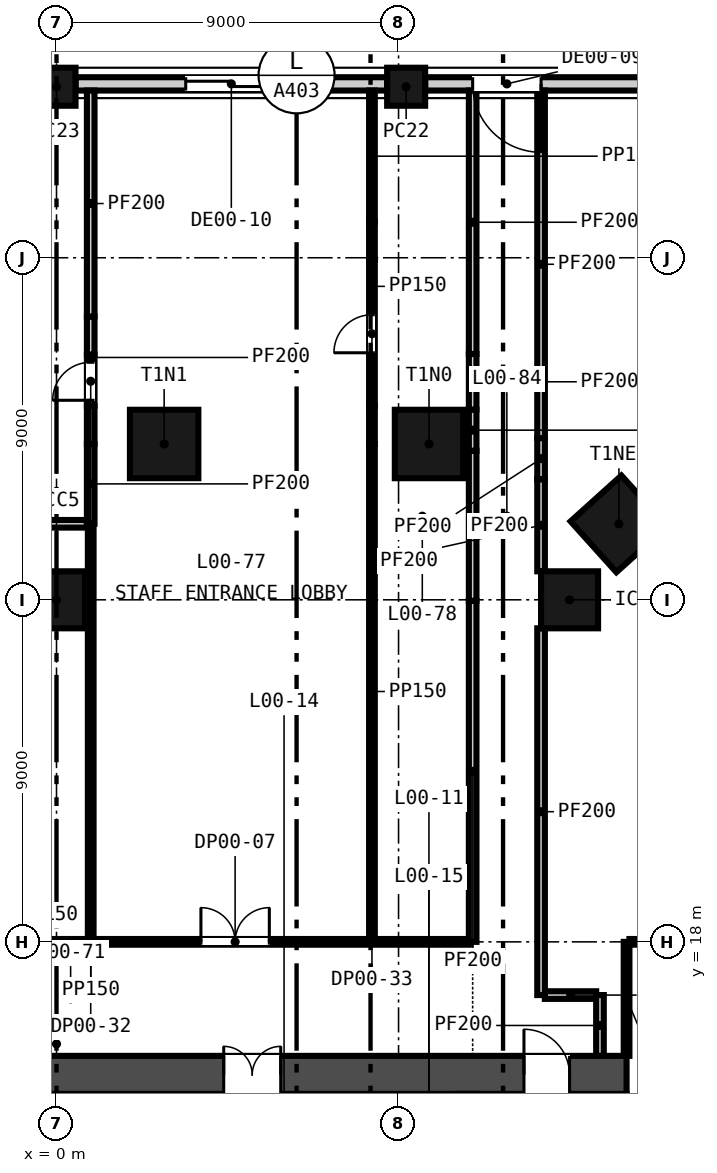
"""IFC4 building model, lengths in metres.
Left out: names, types, materials, properties, quantities, classifications, styles, units other than length and angle.
Written with IfcOpenShell. Run it as: python <this file> out.ifc"""

import sys

from ifc_helpers import new_model, si_unit, direction, frame, frame_2d, origin, origin_2d, place, context, subcontext, project, spatial, rectangle, extrude, element, fill, save


model = new_model("IFC4")
c1 = context("Model", 3, precision=1e-05, world=origin(), true_north=direction((0.0, 1.0)))
c2 = subcontext(c1, "Body", "Model", "MODEL_VIEW")
j1 = project(units=[si_unit("LENGTHUNIT", "METRE"), si_unit("PLANEANGLEUNIT", "RADIAN")], contexts=[c1])
p1 = place(None, origin())
s1 = spatial("IfcSite", under=j1, at=p1, CompositionType="ELEMENT")
p2 = place(p1, origin())
s2 = spatial("IfcBuilding", under=s1, at=p2, CompositionType="ELEMENT")
p3 = place(p2, origin())
s3 = spatial("IfcBuildingStorey", under=s2, at=p3, CompositionType="ELEMENT", Elevation=0.0)
p4 = place(p3, frame((-15.0, 14.5, -2.2), z_axis=(0.0, 0.0, 1.0), x_axis=(1.0, 0.0, 0.0)))
e1 = element("IfcWall", 1, at=p4, inside=s3, PredefinedType="SOLIDWALL", context=c2, shape_type="SweptSolid", body=[
    extrude(rectangle(XDim=30.0, YDim=1.0, at=frame_2d((15.0, 0.0))), origin(), (0.0, 0.0, 1.0), 10.8),
])
p5 = place(p4, frame((9.25, 0.0, 2.2)))
e2 = element("IfcOpeningElement", 2, at=p5, cuts=e1, PredefinedType="OPENING", context=c2, shape_type="SweptSolid", body=[
    extrude(rectangle(XDim=1.5, YDim=2.1, at=frame_2d((0.75, 1.05))), frame((0.0, 0.51, 0.0), z_axis=(0.0, -1.0, 0.0), x_axis=(1.0, 0.0, 0.0)), (0.0, 0.0, 1.0), 1.02),
])
p6 = place(p4, frame((19.4, 0.0, 2.2)))
e3 = element("IfcOpeningElement", 3, at=p6, cuts=e1, PredefinedType="OPENING", context=c2, shape_type="SweptSolid", body=[
    extrude(rectangle(XDim=1.5, YDim=2.1, at=frame_2d((0.75, 1.05))), frame((0.0, 0.51, 0.0), z_axis=(0.0, -1.0, 0.0), x_axis=(1.0, 0.0, 0.0)), (0.0, 0.0, 1.0), 1.02),
])
p7 = place(p4, frame((1.5, 0.0, 2.2)))
e4 = element("IfcOpeningElement", 4, at=p7, cuts=e1, PredefinedType="OPENING", context=c2, shape_type="SweptSolid", body=[
    extrude(rectangle(XDim=1.2, YDim=2.1, at=frame_2d((0.6, 1.05))), frame((0.0, 0.51, 0.0), z_axis=(0.0, -1.0, 0.0), x_axis=(1.0, 0.0, 0.0)), (0.0, 0.0, 1.0), 1.02),
])
p8 = place(p4, frame((27.3, 0.0, 2.2)))
e5 = element("IfcOpeningElement", 5, at=p8, cuts=e1, PredefinedType="OPENING", context=c2, shape_type="SweptSolid", body=[
    extrude(rectangle(XDim=1.2, YDim=2.1, at=frame_2d((0.6, 1.05))), frame((0.0, 0.51, 0.0), z_axis=(0.0, -1.0, 0.0), x_axis=(1.0, 0.0, 0.0)), (0.0, 0.0, 1.0), 1.02),
])
for number, where, z_axis, x_axis in (
    (6, (9.802, 31.1, -0.3), (0.0, 0.0, 1.0), (-1.0, 0.0, 0.0)),
    (7, (2.832, 31.1, -0.3), (0.0, 0.0, 1.0), (-1.0, 0.0, 0.0)),
    (8, (14.799, 28.998, -0.3), (0.0, 0.0, 1.0), (-0.669, 0.743, 0.0)),
):
    element("IfcColumn", number, at=place(p3, frame(where, z_axis=z_axis, x_axis=x_axis)), inside=s3, PredefinedType="COLUMN", context=c2, shape_type="SweptSolid", body=[
        extrude(rectangle(XDim=1.8, YDim=1.8, at=origin_2d()), origin(), (0.0, 0.0, 1.0), 8.9),
    ])
for number, where, z_axis, x_axis in (
    (9, (0.0, 27.0, -0.3), (0.0, 0.0, 1.0), (1.0, 0.0, 0.0)),
    (10, (13.5, 27.0, -0.3), (0.0, 0.0, 1.0), (1.0, 0.0, 0.0)),
):
    element("IfcColumn", number, at=place(p3, frame(where, z_axis=z_axis, x_axis=x_axis)), inside=s3, PredefinedType="COLUMN", context=c2, shape_type="SweptSolid", body=[
        extrude(rectangle(XDim=1.5, YDim=1.5, at=origin_2d()), origin(), (0.0, 0.0, 1.0), 8.9),
    ])
for number, where, z_axis, x_axis in (
    (11, (9.2, 40.5, -0.3), (0.0, 0.0, 1.0), (-1.0, 0.0, 0.0)),
    (12, (0.0, 40.5, -0.3), (0.0, 0.0, 1.0), (-1.0, 0.0, 0.0)),
):
    element("IfcColumn", number, at=place(p3, frame(where, z_axis=z_axis, x_axis=x_axis)), inside=s3, PredefinedType="COLUMN", context=c2, shape_type="SweptSolid", body=[
        extrude(rectangle(XDim=1.0, YDim=1.0, at=origin_2d()), origin(), (0.0, 0.0, 1.0), 8.9),
    ])
p9 = place(p3, frame((17.9, 40.575, -0.3), z_axis=(0.0, 0.0, 1.0), x_axis=(-1.0, 0.0, 0.0)))
e13 = element("IfcWall", 13, at=p9, inside=s3, PredefinedType="SOLIDWALL", context=c2, shape_type="SweptSolid", body=[
    extrude(rectangle(XDim=8.2, YDim=0.35, at=frame_2d((4.1, 0.0))), origin(), (0.0, 0.0, 1.0), 8.0),
])
p10 = place(p9, frame((5.15, 0.0, 0.3)))
e14 = element("IfcOpeningElement", 14, at=p10, cuts=e13, PredefinedType="OPENING", context=c2, shape_type="SweptSolid", body=[
    extrude(rectangle(XDim=1.8, YDim=2.4, at=frame_2d((0.9, 1.2))), frame((0.0, 0.185, 0.0), z_axis=(0.0, -1.0, 0.0), x_axis=(1.0, 0.0, 0.0)), (0.0, 0.0, 1.0), 0.37),
])
p11 = place(p3, frame((8.7, 40.575, -0.3), z_axis=(0.0, 0.0, 1.0), x_axis=(-1.0, 0.0, 0.0)))
e15 = element("IfcWall", 15, at=p11, inside=s3, PredefinedType="SOLIDWALL", context=c2, shape_type="SweptSolid", body=[
    extrude(rectangle(XDim=8.2, YDim=0.35, at=frame_2d((4.1, 0.0))), origin(), (0.0, 0.0, 1.0), 8.0),
])
p12 = place(p11, frame((2.9, 0.0, 0.3)))
e16 = element("IfcOpeningElement", 16, at=p12, cuts=e15, PredefinedType="OPENING", context=c2, shape_type="SweptSolid", body=[
    extrude(rectangle(XDim=2.4, YDim=2.4, at=frame_2d((1.2, 1.2))), frame((0.0, 0.185, 0.0), z_axis=(0.0, -1.0, 0.0), x_axis=(1.0, 0.0, 0.0)), (0.0, 0.0, 1.0), 0.37),
])
for number, where, z_axis, x_axis in (
    (17, (1.475, 11.3, 0.0), (0.0, 0.0, 1.0), (0.0, 1.0, 0.0)),
    (18, (4.275, 11.3, 0.0), (0.0, 0.0, 1.0), (0.0, 1.0, 0.0)),
    (19, (6.025, 11.3, 0.0), (0.0, 0.0, 1.0), (0.0, 1.0, 0.0)),
    (20, (8.825, 11.3, 0.0), (0.0, 0.0, 1.0), (0.0, 1.0, 0.0)),
):
    element("IfcWall", number, at=place(p3, frame(where, z_axis=z_axis, x_axis=x_axis)), inside=s3, PredefinedType="PARTITIONING", context=c2, shape_type="SweptSolid", body=[
        extrude(rectangle(XDim=2.7, YDim=0.25, at=frame_2d((1.35, 0.0))), origin(), (0.0, 0.0, 1.0), 8.6),
    ])
p13 = place(p3, frame((12.85, 16.6, 0.0), z_axis=(0.0, 0.0, 1.0), x_axis=(1.0, 0.0, 0.0)))
e21 = element("IfcWall", 21, at=p13, inside=s3, PredefinedType="PARTITIONING", context=c2, shape_type="SweptSolid", body=[
    extrude(rectangle(XDim=1.35, YDim=0.2, at=frame_2d((0.675, 0.0))), origin(), (0.0, 0.0, 1.0), 8.6),
])
p14 = place(p3, frame((-10.107, 18.0, 0.0), z_axis=(0.0, 0.0, 1.0), x_axis=(1.0, 0.0, 0.0)))
e22 = element("IfcWall", 22, at=p14, inside=s3, PredefinedType="PARTITIONING", context=c2, shape_type="SweptSolid", body=[
    extrude(rectangle(XDim=20.957, YDim=0.15, at=frame_2d((10.479, 0.0))), origin(), (0.0, 0.0, 1.0), 8.6),
])
p15 = place(p14, frame((13.907, 0.0, 0.0)))
e23 = element("IfcOpeningElement", 23, at=p15, cuts=e22, PredefinedType="OPENING", context=c2, shape_type="SweptSolid", body=[
    extrude(rectangle(XDim=1.8, YDim=2.4, at=frame_2d((0.9, 1.2))), frame((0.0, 0.085, 0.0), z_axis=(0.0, -1.0, 0.0), x_axis=(1.0, 0.0, 0.0)), (0.0, 0.0, 1.0), 0.17),
])
p16 = place(p14, frame((4.9, 0.0, 0.0)))
e24 = element("IfcOpeningElement", 24, at=p16, cuts=e22, PredefinedType="OPENING", context=c2, shape_type="SweptSolid", body=[
    extrude(rectangle(XDim=1.0, YDim=2.1, at=frame_2d((0.5, 1.05))), frame((0.0, 0.085, 0.0), z_axis=(0.0, -1.0, 0.0), x_axis=(1.0, 0.0, 0.0)), (0.0, 0.0, 1.0), 0.17),
])
p17 = place(p3, frame((15.075, 18.0, 0.0), z_axis=(0.0, 0.0, 1.0), x_axis=(1.0, 0.0, 0.0)))
e25 = element("IfcWall", 25, at=p17, inside=s3, PredefinedType="PARTITIONING", context=c2, shape_type="SweptSolid", body=[
    extrude(rectangle(XDim=2.85, YDim=0.15, at=frame_2d((1.425, 0.0))), origin(), (0.0, 0.0, 1.0), 8.6),
])
p18 = place(p3, frame((-10.107, 29.0, 0.0), z_axis=(0.0, 0.0, 1.0), x_axis=(1.0, 0.0, 0.0)))
e26 = element("IfcWall", 26, at=p18, inside=s3, PredefinedType="PARTITIONING", context=c2, shape_type="SweptSolid", body=[
    extrude(rectangle(XDim=10.907, YDim=0.2, at=frame_2d((5.454, 0.0))), origin(), (0.0, 0.0, 1.0), 8.6),
])
p19 = place(p3, frame((0.9, 18.075, 0.0), z_axis=(0.0, 0.0, 1.0), x_axis=(0.0, 1.0, 0.0)))
e27 = element("IfcWall", 27, at=p19, inside=s3, PredefinedType="PARTITIONING", context=c2, shape_type="SweptSolid", body=[
    extrude(rectangle(XDim=10.925, YDim=0.15, at=frame_2d((5.462, 0.0))), origin(), (0.0, 0.0, 1.0), 8.6),
])
p20 = place(p3, frame((0.9, 29.0, 0.0), z_axis=(0.0, 0.0, 1.0), x_axis=(0.0, 1.0, 0.0)))
e28 = element("IfcWall", 28, at=p20, inside=s3, PredefinedType="PARTITIONING", context=c2, shape_type="SweptSolid", body=[
    extrude(rectangle(XDim=2.1, YDim=0.2, at=frame_2d((1.05, 0.0))), origin(), (0.0, 0.0, 1.0), 8.6),
])
p21 = place(p3, frame((0.9, 31.1, 0.0), z_axis=(0.0, 0.0, 1.0), x_axis=(0.0, 1.0, 0.0)))
e29 = element("IfcWall", 29, at=p21, inside=s3, PredefinedType="PARTITIONING", context=c2, shape_type="SweptSolid", body=[
    extrude(rectangle(XDim=1.0, YDim=0.2, at=frame_2d((0.5, 0.0))), origin(), (0.0, 0.0, 1.0), 7.6),
])
p22 = place(p3, frame((0.9, 32.1, 0.0), z_axis=(0.0, 0.0, 1.0), x_axis=(0.0, 1.0, 0.0)))
e30 = element("IfcWall", 30, at=p22, inside=s3, PredefinedType="PARTITIONING", context=c2, shape_type="SweptSolid", body=[
    extrude(rectangle(XDim=1.353, YDim=0.2, at=frame_2d((0.677, 0.0))), origin(), (0.0, 0.0, 1.0), 8.6),
])
p23 = place(p22, frame((0.15, 0.0, 0.0)))
e31 = element("IfcOpeningElement", 31, at=p23, cuts=e30, PredefinedType="OPENING", context=c2, shape_type="SweptSolid", body=[
    extrude(rectangle(XDim=1.0, YDim=2.1, at=frame_2d((0.5, 1.05))), frame((0.0, 0.11, 0.0), z_axis=(0.0, -1.0, 0.0), x_axis=(1.0, 0.0, 0.0)), (0.0, 0.0, 1.0), 0.22),
])
p24 = place(p3, frame((0.9, 33.453, 0.0), z_axis=(0.0, 0.0, 1.0), x_axis=(0.0, 1.0, 0.0)))
e32 = element("IfcWall", 32, at=p24, inside=s3, PredefinedType="PARTITIONING", context=c2, shape_type="SweptSolid", body=[
    extrude(rectangle(XDim=1.0, YDim=0.2, at=frame_2d((0.5, 0.0))), origin(), (0.0, 0.0, 1.0), 7.921),
])
p25 = place(p3, frame((0.9, 34.453, 0.0), z_axis=(0.0, 0.0, 1.0), x_axis=(0.0, 1.0, 0.0)))
e33 = element("IfcWall", 33, at=p25, inside=s3, PredefinedType="PARTITIONING", context=c2, shape_type="SweptSolid", body=[
    extrude(rectangle(XDim=5.947, YDim=0.2, at=frame_2d((2.973, 0.0))), origin(), (0.0, 0.0, 1.0), 8.6),
])
p26 = place(p3, frame((8.3, 18.075, 0.0), z_axis=(0.0, 0.0, 1.0), x_axis=(0.0, 1.0, 0.0)))
e34 = element("IfcWall", 34, at=p26, inside=s3, PredefinedType="PARTITIONING", context=c2, shape_type="SweptSolid", body=[
    extrude(rectangle(XDim=13.025, YDim=0.15, at=frame_2d((6.513, 0.0))), origin(), (0.0, 0.0, 1.0), 8.6),
])
p27 = place(p3, frame((8.3, 31.1, 0.0), z_axis=(0.0, 0.0, 1.0), x_axis=(0.0, 1.0, 0.0)))
e35 = element("IfcWall", 35, at=p27, inside=s3, PredefinedType="PARTITIONING", context=c2, shape_type="SweptSolid", body=[
    extrude(rectangle(XDim=1.0, YDim=0.15, at=frame_2d((0.5, 0.0))), origin(), (0.0, 0.0, 1.0), 7.6),
])
p28 = place(p3, frame((8.3, 32.1, 0.0), z_axis=(0.0, 0.0, 1.0), x_axis=(0.0, 1.0, 0.0)))
e36 = element("IfcWall", 36, at=p28, inside=s3, PredefinedType="PARTITIONING", context=c2, shape_type="SweptSolid", body=[
    extrude(rectangle(XDim=3.845, YDim=0.15, at=frame_2d((1.922, 0.0))), origin(), (0.0, 0.0, 1.0), 8.6),
])
p29 = place(p28, frame((1.4, 0.0, 0.0)))
e37 = element("IfcOpeningElement", 37, at=p29, cuts=e36, PredefinedType="OPENING", context=c2, shape_type="SweptSolid", body=[
    extrude(rectangle(XDim=1.0, YDim=2.1, at=frame_2d((0.5, 1.05))), frame((0.0, 0.085, 0.0), z_axis=(0.0, -1.0, 0.0), x_axis=(1.0, 0.0, 0.0)), (0.0, 0.0, 1.0), 0.17),
])
p30 = place(p3, frame((8.3, 35.945, 0.0), z_axis=(0.0, 0.0, 1.0), x_axis=(0.0, 1.0, 0.0)))
e38 = element("IfcWall", 38, at=p30, inside=s3, PredefinedType="PARTITIONING", context=c2, shape_type="SweptSolid", body=[
    extrude(rectangle(XDim=1.0, YDim=0.15, at=frame_2d((0.5, 0.0))), origin(), (0.0, 0.0, 1.0), 7.921),
])
p31 = place(p3, frame((8.3, 36.945, 0.0), z_axis=(0.0, 0.0, 1.0), x_axis=(0.0, 1.0, 0.0)))
e39 = element("IfcWall", 39, at=p31, inside=s3, PredefinedType="PARTITIONING", context=c2, shape_type="SweptSolid", body=[
    extrude(rectangle(XDim=3.455, YDim=0.15, at=frame_2d((1.728, 0.0))), origin(), (0.0, 0.0, 1.0), 8.6),
])
p32 = place(p3, frame((10.95, 18.0, 0.0), z_axis=(0.0, 0.0, 1.0), x_axis=(0.0, 1.0, 0.0)))
e40 = element("IfcWall", 40, at=p32, inside=s3, PredefinedType="PARTITIONING", context=c2, shape_type="SweptSolid", body=[
    extrude(rectangle(XDim=8.973, YDim=0.2, at=frame_2d((4.486, 0.0))), origin(), (0.0, 0.0, 1.0), 7.921),
])
p33 = place(p3, frame((10.95, 26.973, 0.0), z_axis=(0.0, 0.0, 1.0), x_axis=(0.0, 1.0, 0.0)))
e41 = element("IfcWall", 41, at=p33, inside=s3, PredefinedType="PARTITIONING", context=c2, shape_type="SweptSolid", body=[
    extrude(rectangle(XDim=3.949, YDim=0.2, at=frame_2d((1.975, 0.0))), origin(), (0.0, 0.0, 1.0), 8.6),
])
p34 = place(p3, frame((10.95, 30.922, 0.0), z_axis=(0.0, 0.0, 1.0), x_axis=(0.0, 1.0, 0.0)))
e42 = element("IfcWall", 42, at=p34, inside=s3, PredefinedType="PARTITIONING", context=c2, shape_type="SweptSolid", body=[
    extrude(rectangle(XDim=1.083, YDim=0.2, at=frame_2d((0.542, 0.0))), origin(), (0.0, 0.0, 1.0), 7.6),
])
p35 = place(p3, frame((10.95, 32.005, 0.0), z_axis=(0.0, 0.0, 1.0), x_axis=(0.0, 1.0, 0.0)))
e43 = element("IfcWall", 43, at=p35, inside=s3, PredefinedType="PARTITIONING", context=c2, shape_type="SweptSolid", body=[
    extrude(rectangle(XDim=1.463, YDim=0.2, at=frame_2d((0.732, 0.0))), origin(), (0.0, 0.0, 1.0), 7.921),
])
p36 = place(p3, frame((10.95, 33.469, 0.0), z_axis=(0.0, 0.0, 1.0), x_axis=(0.0, 1.0, 0.0)))
e44 = element("IfcWall", 44, at=p36, inside=s3, PredefinedType="PARTITIONING", context=c2, shape_type="SweptSolid", body=[
    extrude(rectangle(XDim=6.931, YDim=0.2, at=frame_2d((3.466, 0.0))), origin(), (0.0, 0.0, 1.0), 8.6),
])
p37 = place(p3, frame((12.75, 16.6, 0.0), z_axis=(0.0, 0.0, 1.0), x_axis=(0.0, 1.0, 0.0)))
e45 = element("IfcWall", 45, at=p37, inside=s3, PredefinedType="PARTITIONING", context=c2, shape_type="SweptSolid", body=[
    extrude(rectangle(XDim=9.65, YDim=0.2, at=frame_2d((4.825, 0.0))), origin(), (0.0, 0.0, 1.0), 8.6),
])
p38 = place(p3, frame((12.75, 27.75, 0.0), z_axis=(0.0, 0.0, 1.0), x_axis=(0.0, 1.0, 0.0)))
e46 = element("IfcWall", 46, at=p38, inside=s3, PredefinedType="PARTITIONING", context=c2, shape_type="SweptSolid", body=[
    extrude(rectangle(XDim=2.424, YDim=0.2, at=frame_2d((1.212, 0.0))), origin(), (0.0, 0.0, 1.0), 8.6),
])
p39 = place(p3, frame((12.75, 30.174, 0.0), z_axis=(0.0, 0.0, 1.0), x_axis=(0.0, 1.0, 0.0)))
e47 = element("IfcWall", 47, at=p39, inside=s3, PredefinedType="PARTITIONING", context=c2, shape_type="SweptSolid", body=[
    extrude(rectangle(XDim=1.083, YDim=0.2, at=frame_2d((0.542, 0.0))), origin(), (0.0, 0.0, 1.0), 7.6),
])
p40 = place(p3, frame((12.75, 31.257, 0.0), z_axis=(0.0, 0.0, 1.0), x_axis=(0.0, 1.0, 0.0)))
e48 = element("IfcWall", 48, at=p40, inside=s3, PredefinedType="PARTITIONING", context=c2, shape_type="SweptSolid", body=[
    extrude(rectangle(XDim=9.143, YDim=0.2, at=frame_2d((4.572, 0.0))), origin(), (0.0, 0.0, 1.0), 8.6),
])
p41 = place(p3, frame((14.3, 15.0, 0.0), z_axis=(0.0, 0.0, 1.0), x_axis=(0.0, 1.0, 0.0)))
e49 = element("IfcWall", 49, at=p41, inside=s3, PredefinedType="PARTITIONING", context=c2, shape_type="SweptSolid", body=[
    extrude(rectangle(XDim=1.6, YDim=0.2, at=frame_2d((0.8, 0.0))), origin(), (0.0, 0.0, 1.0), 8.6),
])
p42 = place(p3, frame((15.0, 15.0, 0.0), z_axis=(0.0, 0.0, 1.0), x_axis=(0.0, 1.0, 0.0)))
e50 = element("IfcWall", 50, at=p42, inside=s3, PredefinedType="PARTITIONING", context=c2, shape_type="SweptSolid", body=[
    extrude(rectangle(XDim=3.0, YDim=0.15, at=frame_2d((1.5, 0.0))), origin(), (0.0, 0.0, 1.0), 8.6),
])
p43 = place(p10, frame((1.8, 0.0, 0.0), z_axis=(0.0, 0.0, 1.0), x_axis=(-1.0, 0.0, 0.0)))
e51 = element("IfcDoor", 51, at=p43, inside=s3, OperationType="SINGLE_SWING_LEFT", PredefinedType="DOOR", context=c2, shape_type="SweptSolid", body=[
    extrude(rectangle(XDim=1.8, YDim=2.4, at=frame_2d((0.9, 1.2))), frame((0.0, 0.025, 0.0), z_axis=(0.0, -1.0, 0.0), x_axis=(1.0, 0.0, 0.0)), (0.0, 0.0, 1.0), 0.05),
])
fill(e14, e51)
p44 = place(p12, origin())
e52 = element("IfcDoor", 52, at=p44, inside=s3, OperationType="DOUBLE_DOOR_SLIDING", PredefinedType="DOOR", context=c2, shape_type="SweptSolid", body=[
    extrude(rectangle(XDim=2.4, YDim=2.4, at=frame_2d((1.2, 1.2))), frame((0.0, 0.025, 0.0), z_axis=(0.0, -1.0, 0.0), x_axis=(1.0, 0.0, 0.0)), (0.0, 0.0, 1.0), 0.05),
])
fill(e16, e52)
p45 = place(p6, origin())
e53 = element("IfcDoor", 53, at=p45, inside=s3, OperationType="DOUBLE_DOOR_SINGLE_SWING", PredefinedType="DOOR", context=c2, shape_type="SweptSolid", body=[
    extrude(rectangle(XDim=1.5, YDim=2.1, at=frame_2d((0.75, 1.05))), frame((0.0, 0.025, 0.0), z_axis=(0.0, -1.0, 0.0), x_axis=(1.0, 0.0, 0.0)), (0.0, 0.0, 1.0), 0.05),
])
fill(e3, e53)
p46 = place(p8, origin())
e54 = element("IfcDoor", 54, at=p46, inside=s3, OperationType="SINGLE_SWING_LEFT", PredefinedType="DOOR", context=c2, shape_type="SweptSolid", body=[
    extrude(rectangle(XDim=1.2, YDim=2.1, at=frame_2d((0.6, 1.05))), frame((0.0, 0.025, 0.0), z_axis=(0.0, -1.0, 0.0), x_axis=(1.0, 0.0, 0.0)), (0.0, 0.0, 1.0), 0.05),
])
fill(e5, e54)
p47 = place(p15, origin())
e55 = element("IfcDoor", 55, at=p47, inside=s3, OperationType="SINGLE_SWING_LEFT", PredefinedType="DOOR", context=c2, shape_type="SweptSolid", body=[
    extrude(rectangle(XDim=1.8, YDim=2.4, at=frame_2d((0.9, 1.2))), frame((0.0, 0.025, 0.0), z_axis=(0.0, -1.0, 0.0), x_axis=(1.0, 0.0, 0.0)), (0.0, 0.0, 1.0), 0.05),
])
fill(e23, e55)
p48 = place(p23, origin())
e56 = element("IfcDoor", 56, at=p48, inside=s3, OperationType="SINGLE_SWING_LEFT", PredefinedType="DOOR", context=c2, shape_type="SweptSolid", body=[
    extrude(rectangle(XDim=1.0, YDim=2.1, at=frame_2d((0.5, 1.05))), frame((0.0, 0.025, 0.0), z_axis=(0.0, -1.0, 0.0), x_axis=(1.0, 0.0, 0.0)), (0.0, 0.0, 1.0), 0.05),
])
fill(e31, e56)
p49 = place(p29, origin())
e57 = element("IfcDoor", 57, at=p49, inside=s3, OperationType="SINGLE_SWING_LEFT", PredefinedType="DOOR", context=c2, shape_type="SweptSolid", body=[
    extrude(rectangle(XDim=1.0, YDim=2.1, at=frame_2d((0.5, 1.05))), frame((0.0, 0.025, 0.0), z_axis=(0.0, -1.0, 0.0), x_axis=(1.0, 0.0, 0.0)), (0.0, 0.0, 1.0), 0.05),
])
fill(e37, e57)
save(model, sys.argv[1])
